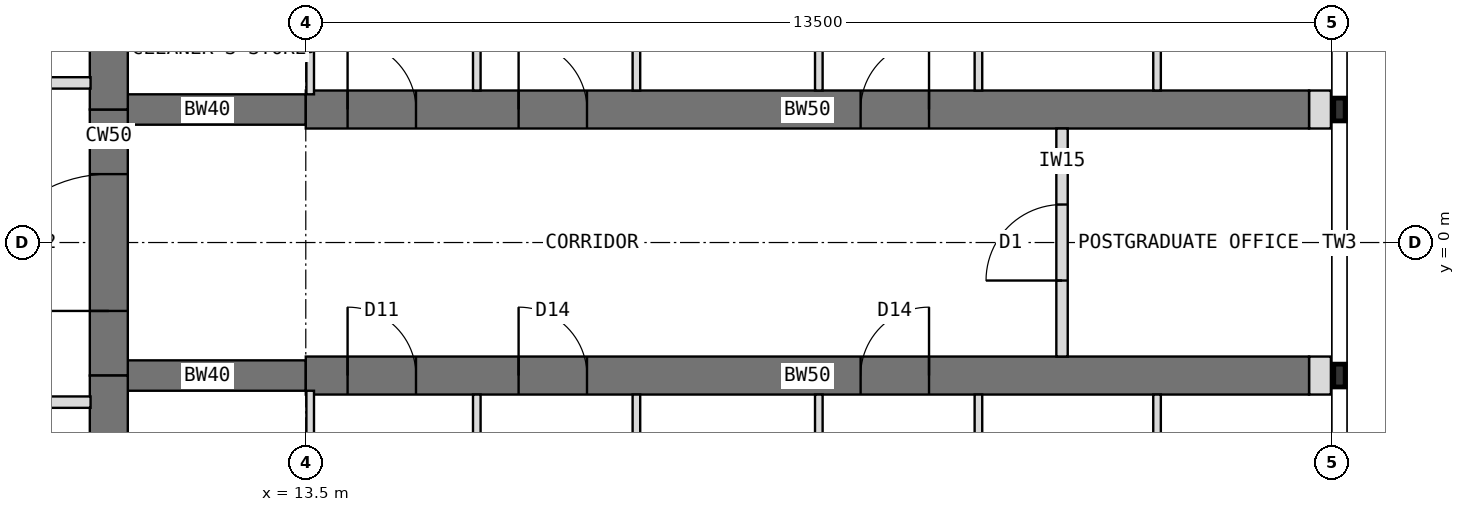
"""IFC4 building model, lengths in metres.
Left out: names, types, materials, properties, quantities, classifications, styles, units other than length and angle.
Written with IfcOpenShell. Run it as: python <this file> out.ifc"""

import sys

from ifc_helpers import new_model, si_unit, direction, frame, frame_2d, origin, place, context, subcontext, project, spatial, rectangle, extrude, element, fill, save


model = new_model("IFC4")
c1 = context("Model", 3, precision=1e-05, world=origin(), true_north=direction((0.0, 1.0)))
c2 = subcontext(c1, "Body", "Model", "MODEL_VIEW")
j1 = project(units=[si_unit("LENGTHUNIT", "METRE"), si_unit("PLANEANGLEUNIT", "RADIAN")], contexts=[c1])
p1 = place(None, origin())
s1 = spatial("IfcSite", under=j1, at=p1, CompositionType="ELEMENT")
p2 = place(p1, origin())
s2 = spatial("IfcBuilding", under=s1, at=p2, CompositionType="ELEMENT")
p3 = place(p2, frame((0.0, 0.0, 234.5)))
s3 = spatial("IfcBuildingStorey", under=s2, at=p3, CompositionType="ELEMENT", Elevation=234.5)
p4 = place(p3, frame((10.908, -6.298, 0.0), z_axis=(0.0, 0.0, 1.0), x_axis=(0.0, 1.0, 0.0)))
e1 = element("IfcWall", 1, at=p4, inside=s3, PredefinedType="SHEAR", context=c2, shape_type="SweptSolid", body=[
    extrude(rectangle(XDim=4.548, YDim=0.5, at=frame_2d((2.274, 0.0))), origin(), (0.0, 0.0, 1.0), 4.0),
])
p5 = place(p3, frame((10.908, -1.75, 0.0), z_axis=(0.0, 0.0, 1.0), x_axis=(0.0, 1.0, 0.0)))
e2 = element("IfcWall", 2, at=p5, inside=s3, PredefinedType="SHEAR", context=c2, shape_type="SweptSolid", body=[
    extrude(rectangle(XDim=3.5, YDim=0.5, at=frame_2d((1.75, 0.0))), origin(), (0.0, 0.0, 1.0), 4.0),
])
p6 = place(p5, frame((0.85, 0.0, 0.0)))
e3 = element("IfcOpeningElement", 3, at=p6, cuts=e2, PredefinedType="OPENING", context=c2, shape_type="SweptSolid", body=[
    extrude(rectangle(XDim=1.8, YDim=2.1, at=frame_2d((0.9, 1.05))), frame((0.0, 0.26, 0.0), z_axis=(0.0, -1.0, 0.0), x_axis=(1.0, 0.0, 0.0)), (0.0, 0.0, 1.0), 0.52),
])
p7 = place(p3, frame((10.908, 1.75, 0.0), z_axis=(0.0, 0.0, 1.0), x_axis=(0.0, 1.0, 0.0)))
e4 = element("IfcWall", 4, at=p7, inside=s3, PredefinedType="SHEAR", context=c2, shape_type="SweptSolid", body=[
    extrude(rectangle(XDim=4.548, YDim=0.5, at=frame_2d((2.274, 0.0))), origin(), (0.0, 0.0, 1.0), 4.0),
])
p8 = place(p3, frame((10.908, 1.75, 0.0), z_axis=(0.0, 0.0, 1.0), x_axis=(1.0, 0.0, 0.0)))
e5 = element("IfcWall", 5, at=p8, inside=s3, PredefinedType="SHEAR", context=c2, shape_type="SweptSolid", body=[
    extrude(rectangle(XDim=2.592, YDim=0.4, at=frame_2d((1.296, 0.0))), origin(), (0.0, 0.0, 1.0), 4.0),
])
p9 = place(p3, frame((13.5, 1.75, 0.0), z_axis=(0.0, 0.0, 1.0), x_axis=(1.0, 0.0, 0.0)))
e6 = element("IfcWall", 6, at=p9, inside=s3, PredefinedType="SHEAR", context=c2, shape_type="SweptSolid", body=[
    extrude(rectangle(XDim=13.2, YDim=0.5, at=frame_2d((6.6, 0.0))), origin(), (0.0, 0.0, 1.0), 4.0),
])
p10 = place(p9, frame((0.55, 0.0, 0.0)))
e7 = element("IfcOpeningElement", 7, at=p10, cuts=e6, PredefinedType="OPENING", context=c2, shape_type="SweptSolid", body=[
    extrude(rectangle(XDim=0.9, YDim=2.1, at=frame_2d((0.45, 1.05))), frame((0.0, 0.26, 0.0), z_axis=(0.0, -1.0, 0.0), x_axis=(1.0, 0.0, 0.0)), (0.0, 0.0, 1.0), 0.52),
])
p11 = place(p9, frame((2.8, 0.0, 0.0)))
e8 = element("IfcOpeningElement", 8, at=p11, cuts=e6, PredefinedType="OPENING", context=c2, shape_type="SweptSolid", body=[
    extrude(rectangle(XDim=0.9, YDim=2.1, at=frame_2d((0.45, 1.05))), frame((0.0, 0.26, 0.0), z_axis=(0.0, -1.0, 0.0), x_axis=(1.0, 0.0, 0.0)), (0.0, 0.0, 1.0), 0.52),
])
p12 = place(p9, frame((7.3, 0.0, 0.0)))
e9 = element("IfcOpeningElement", 9, at=p12, cuts=e6, PredefinedType="OPENING", context=c2, shape_type="SweptSolid", body=[
    extrude(rectangle(XDim=0.9, YDim=2.1, at=frame_2d((0.45, 1.05))), frame((0.0, 0.26, 0.0), z_axis=(0.0, -1.0, 0.0), x_axis=(1.0, 0.0, 0.0)), (0.0, 0.0, 1.0), 0.52),
])
p13 = place(p3, frame((10.908, -1.75, 0.0), z_axis=(0.0, 0.0, 1.0), x_axis=(1.0, 0.0, 0.0)))
e10 = element("IfcWall", 10, at=p13, inside=s3, PredefinedType="SHEAR", context=c2, shape_type="SweptSolid", body=[
    extrude(rectangle(XDim=2.592, YDim=0.4, at=frame_2d((1.296, 0.0))), origin(), (0.0, 0.0, 1.0), 4.0),
])
p14 = place(p3, frame((13.5, -1.75, 0.0), z_axis=(0.0, 0.0, 1.0), x_axis=(1.0, 0.0, 0.0)))
e11 = element("IfcWall", 11, at=p14, inside=s3, PredefinedType="SHEAR", context=c2, shape_type="SweptSolid", body=[
    extrude(rectangle(XDim=13.2, YDim=0.5, at=frame_2d((6.6, 0.0))), origin(), (0.0, 0.0, 1.0), 4.0),
])
p15 = place(p14, frame((0.55, 0.0, 0.0)))
e12 = element("IfcOpeningElement", 12, at=p15, cuts=e11, PredefinedType="OPENING", context=c2, shape_type="SweptSolid", body=[
    extrude(rectangle(XDim=0.9, YDim=2.1, at=frame_2d((0.45, 1.05))), frame((0.0, 0.26, 0.0), z_axis=(0.0, -1.0, 0.0), x_axis=(1.0, 0.0, 0.0)), (0.0, 0.0, 1.0), 0.52),
])
p16 = place(p14, frame((2.8, 0.0, 0.0)))
e13 = element("IfcOpeningElement", 13, at=p16, cuts=e11, PredefinedType="OPENING", context=c2, shape_type="SweptSolid", body=[
    extrude(rectangle(XDim=0.9, YDim=2.1, at=frame_2d((0.45, 1.05))), frame((0.0, 0.26, 0.0), z_axis=(0.0, -1.0, 0.0), x_axis=(1.0, 0.0, 0.0)), (0.0, 0.0, 1.0), 0.52),
])
p17 = place(p14, frame((7.3, 0.0, 0.0)))
e14 = element("IfcOpeningElement", 14, at=p17, cuts=e11, PredefinedType="OPENING", context=c2, shape_type="SweptSolid", body=[
    extrude(rectangle(XDim=0.9, YDim=2.1, at=frame_2d((0.45, 1.05))), frame((0.0, 0.26, 0.0), z_axis=(0.0, -1.0, 0.0), x_axis=(1.0, 0.0, 0.0)), (0.0, 0.0, 1.0), 0.52),
])
for number, where, z_axis, x_axis in (
    (15, (26.7, 1.75, 0.0), (0.0, 0.0, 1.0), (1.0, 0.0, 0.0)),
    (16, (26.7, -1.75, 0.0), (0.0, 0.0, 1.0), (1.0, 0.0, 0.0)),
):
    element("IfcWall", number, at=place(p3, frame(where, z_axis=z_axis, x_axis=x_axis)), inside=s3, PredefinedType="PARTITIONING", context=c2, shape_type="SweptSolid", body=[
        extrude(rectangle(XDim=0.288, YDim=0.5, at=frame_2d((0.144, 0.0))), origin(), (0.0, 0.0, 1.0), 3.7),
    ])
for number, where, z_axis, x_axis in (
    (17, (15.75, 2.0, 0.0), (0.0, 0.0, 1.0), (0.0, 1.0, 0.0)),
    (18, (20.25, 2.0, 0.0), (0.0, 0.0, 1.0), (0.0, 1.0, 0.0)),
):
    element("IfcWall", number, at=place(p3, frame(where, z_axis=z_axis, x_axis=x_axis)), inside=s3, PredefinedType="PARTITIONING", context=c2, shape_type="SweptSolid", body=[
        extrude(rectangle(XDim=4.75, YDim=0.1, at=frame_2d((2.375, 0.0))), origin(), (0.0, 0.0, 1.0), 3.7),
    ])
p18 = place(p3, frame((17.85, 2.0, 0.0), z_axis=(0.0, 0.0, 1.0), x_axis=(0.0, 1.0, 0.0)))
e19 = element("IfcWall", 19, at=p18, inside=s3, PredefinedType="PARTITIONING", context=c2, shape_type="SweptSolid", body=[
    extrude(rectangle(XDim=3.4, YDim=0.1, at=frame_2d((1.7, 0.0))), origin(), (0.0, 0.0, 1.0), 3.7),
])
p19 = place(p18, frame((1.25, 0.0, 0.0)))
e20 = element("IfcOpeningElement", 20, at=p19, cuts=e19, PredefinedType="OPENING", context=c2, shape_type="SweptSolid", body=[
    extrude(rectangle(XDim=0.9, YDim=2.1, at=frame_2d((0.45, 1.05))), frame((0.0, 0.06, 0.0), z_axis=(0.0, -1.0, 0.0), x_axis=(1.0, 0.0, 0.0)), (0.0, 0.0, 1.0), 0.12),
])
p20 = place(p3, frame((22.35, 2.0, 0.0), z_axis=(0.0, 0.0, 1.0), x_axis=(0.0, 1.0, 0.0)))
e21 = element("IfcWall", 21, at=p20, inside=s3, PredefinedType="PARTITIONING", context=c2, shape_type="SweptSolid", body=[
    extrude(rectangle(XDim=3.4, YDim=0.1, at=frame_2d((1.7, 0.0))), origin(), (0.0, 0.0, 1.0), 3.7),
])
p21 = place(p20, frame((1.25, 0.0, 0.0)))
e22 = element("IfcOpeningElement", 22, at=p21, cuts=e21, PredefinedType="OPENING", context=c2, shape_type="SweptSolid", body=[
    extrude(rectangle(XDim=0.9, YDim=2.1, at=frame_2d((0.45, 1.05))), frame((0.0, 0.06, 0.0), z_axis=(0.0, -1.0, 0.0), x_axis=(1.0, 0.0, 0.0)), (0.0, 0.0, 1.0), 0.12),
])
p22 = place(p3, frame((24.7, 2.0, 0.0), z_axis=(0.0, 0.0, 1.0), x_axis=(0.0, 1.0, 0.0)))
e23 = element("IfcWall", 23, at=p22, inside=s3, PredefinedType="PARTITIONING", context=c2, shape_type="SweptSolid", body=[
    extrude(rectangle(XDim=3.4, YDim=0.1, at=frame_2d((1.7, 0.0))), origin(), (0.0, 0.0, 1.0), 3.7),
])
p23 = place(p3, frame((13.558, 1.95, 0.0), z_axis=(0.0, 0.0, 1.0), x_axis=(0.0, 1.0, 0.0)))
e24 = element("IfcWall", 24, at=p23, inside=s3, PredefinedType="PARTITIONING", context=c2, shape_type="SweptSolid", body=[
    extrude(rectangle(XDim=1.2, YDim=0.1, at=frame_2d((0.6, 0.0))), origin(), (0.0, 0.0, 1.0), 3.167),
])
for number, where, z_axis, x_axis in (
    (25, (15.75, -2.0, 0.0), (0.0, 0.0, 1.0), (0.0, -1.0, 0.0)),
    (26, (20.25, -2.0, 0.0), (0.0, 0.0, 1.0), (0.0, -1.0, 0.0)),
):
    element("IfcWall", number, at=place(p3, frame(where, z_axis=z_axis, x_axis=x_axis)), inside=s3, PredefinedType="PARTITIONING", context=c2, shape_type="SweptSolid", body=[
        extrude(rectangle(XDim=4.75, YDim=0.1, at=frame_2d((2.375, 0.0))), origin(), (0.0, 0.0, 1.0), 3.7),
    ])
p24 = place(p3, frame((17.85, -2.0, 0.0), z_axis=(0.0, 0.0, 1.0), x_axis=(0.0, -1.0, 0.0)))
e27 = element("IfcWall", 27, at=p24, inside=s3, PredefinedType="PARTITIONING", context=c2, shape_type="SweptSolid", body=[
    extrude(rectangle(XDim=3.4, YDim=0.1, at=frame_2d((1.7, 0.0))), origin(), (0.0, 0.0, 1.0), 3.7),
])
p25 = place(p24, frame((1.25, 0.0, 0.0)))
e28 = element("IfcOpeningElement", 28, at=p25, cuts=e27, PredefinedType="OPENING", context=c2, shape_type="SweptSolid", body=[
    extrude(rectangle(XDim=0.9, YDim=2.1, at=frame_2d((0.45, 1.05))), frame((0.0, 0.06, 0.0), z_axis=(0.0, -1.0, 0.0), x_axis=(1.0, 0.0, 0.0)), (0.0, 0.0, 1.0), 0.12),
])
p26 = place(p3, frame((22.35, -2.0, 0.0), z_axis=(0.0, 0.0, 1.0), x_axis=(0.0, -1.0, 0.0)))
e29 = element("IfcWall", 29, at=p26, inside=s3, PredefinedType="PARTITIONING", context=c2, shape_type="SweptSolid", body=[
    extrude(rectangle(XDim=3.4, YDim=0.1, at=frame_2d((1.7, 0.0))), origin(), (0.0, 0.0, 1.0), 3.7),
])
p27 = place(p26, frame((1.25, 0.0, 0.0)))
e30 = element("IfcOpeningElement", 30, at=p27, cuts=e29, PredefinedType="OPENING", context=c2, shape_type="SweptSolid", body=[
    extrude(rectangle(XDim=0.9, YDim=2.1, at=frame_2d((0.45, 1.05))), frame((0.0, 0.06, 0.0), z_axis=(0.0, -1.0, 0.0), x_axis=(1.0, 0.0, 0.0)), (0.0, 0.0, 1.0), 0.12),
])
p28 = place(p3, frame((24.7, -2.0, 0.0), z_axis=(0.0, 0.0, 1.0), x_axis=(0.0, -1.0, 0.0)))
e31 = element("IfcWall", 31, at=p28, inside=s3, PredefinedType="PARTITIONING", context=c2, shape_type="SweptSolid", body=[
    extrude(rectangle(XDim=3.4, YDim=0.1, at=frame_2d((1.7, 0.0))), origin(), (0.0, 0.0, 1.0), 3.7),
])
p29 = place(p3, frame((13.558, -1.95, 0.0), z_axis=(0.0, 0.0, 1.0), x_axis=(0.0, -1.0, 0.0)))
e32 = element("IfcWall", 32, at=p29, inside=s3, PredefinedType="PARTITIONING", context=c2, shape_type="SweptSolid", body=[
    extrude(rectangle(XDim=3.2, YDim=0.1, at=frame_2d((1.6, 0.0))), origin(), (0.0, 0.0, 1.0), 3.167),
])
p30 = place(p3, frame((6.143, 2.1, 0.0), z_axis=(0.0, 0.0, 1.0), x_axis=(1.0, 0.0, 0.0)))
e33 = element("IfcWall", 33, at=p30, inside=s3, PredefinedType="PARTITIONING", context=c2, shape_type="SweptSolid", body=[
    extrude(rectangle(XDim=4.526, YDim=0.15, at=frame_2d((2.263, 0.0))), origin(), (0.0, 0.0, 1.0), 3.7),
])
p31 = place(p30, frame((0.858, 0.0, 0.0)))
e34 = element("IfcOpeningElement", 34, at=p31, cuts=e33, PredefinedType="OPENING", context=c2, shape_type="SweptSolid", body=[
    extrude(rectangle(XDim=1.0, YDim=2.1, at=frame_2d((0.5, 1.05))), frame((0.0, 0.085, 0.0), z_axis=(0.0, -1.0, 0.0), x_axis=(1.0, 0.0, 0.0)), (0.0, 0.0, 1.0), 0.17),
])
p32 = place(p3, frame((10.668, -2.1, 0.0), z_axis=(0.0, 0.0, 1.0), x_axis=(-1.0, 0.0, 0.0)))
e35 = element("IfcWall", 35, at=p32, inside=s3, PredefinedType="PARTITIONING", context=c2, shape_type="SweptSolid", body=[
    extrude(rectangle(XDim=4.526, YDim=0.15, at=frame_2d((2.263, 0.0))), origin(), (0.0, 0.0, 1.0), 3.7),
])
p33 = place(p32, frame((2.668, 0.0, 0.0)))
e36 = element("IfcOpeningElement", 36, at=p33, cuts=e35, PredefinedType="OPENING", context=c2, shape_type="SweptSolid", body=[
    extrude(rectangle(XDim=1.0, YDim=2.1, at=frame_2d((0.5, 1.05))), frame((0.0, 0.085, 0.0), z_axis=(0.0, -1.0, 0.0), x_axis=(1.0, 0.0, 0.0)), (0.0, 0.0, 1.0), 0.17),
])
p34 = place(p3, frame((23.45, -1.5, 0.0), z_axis=(0.0, 0.0, 1.0), x_axis=(0.0, 1.0, 0.0)))
e37 = element("IfcWall", 37, at=p34, inside=s3, PredefinedType="PARTITIONING", context=c2, shape_type="SweptSolid", body=[
    extrude(rectangle(XDim=3.0, YDim=0.15, at=frame_2d((1.5, 0.0))), origin(), (0.0, 0.0, 1.0), 3.7),
])
p35 = place(p34, frame((1.0, 0.0, 0.0)))
e38 = element("IfcOpeningElement", 38, at=p35, cuts=e37, PredefinedType="OPENING", context=c2, shape_type="SweptSolid", body=[
    extrude(rectangle(XDim=1.0, YDim=2.1, at=frame_2d((0.5, 1.05))), frame((0.0, 0.085, 0.0), z_axis=(0.0, -1.0, 0.0), x_axis=(1.0, 0.0, 0.0)), (0.0, 0.0, 1.0), 0.17),
])
p36 = place(p6, origin())
e39 = element("IfcDoor", 39, at=p36, inside=s3, OperationType="DOUBLE_DOOR_DOUBLE_SWING", PredefinedType="DOOR", context=c2, shape_type="SweptSolid", body=[
    extrude(rectangle(XDim=1.8, YDim=2.1, at=frame_2d((0.9, 1.05))), frame((0.0, 0.025, 0.0), z_axis=(0.0, -1.0, 0.0), x_axis=(1.0, 0.0, 0.0)), (0.0, 0.0, 1.0), 0.05),
])
fill(e3, e39)
p37 = place(p35, origin())
e40 = element("IfcDoor", 40, at=p37, inside=s3, OperationType="SINGLE_SWING_LEFT", PredefinedType="DOOR", context=c2, shape_type="SweptSolid", body=[
    extrude(rectangle(XDim=1.0, YDim=2.1, at=frame_2d((0.5, 1.05))), frame((0.0, 0.025, 0.0), z_axis=(0.0, -1.0, 0.0), x_axis=(1.0, 0.0, 0.0)), (0.0, 0.0, 1.0), 0.05),
])
fill(e38, e40)
p38 = place(p10, origin())
e41 = element("IfcDoor", 41, at=p38, inside=s3, OperationType="SINGLE_SWING_LEFT", PredefinedType="DOOR", context=c2, shape_type="SweptSolid", body=[
    extrude(rectangle(XDim=0.9, YDim=2.1, at=frame_2d((0.45, 1.05))), frame((0.0, 0.025, 0.0), z_axis=(0.0, -1.0, 0.0), x_axis=(1.0, 0.0, 0.0)), (0.0, 0.0, 1.0), 0.05),
])
fill(e7, e41)
p39 = place(p11, origin())
e42 = element("IfcDoor", 42, at=p39, inside=s3, OperationType="SINGLE_SWING_LEFT", PredefinedType="DOOR", context=c2, shape_type="SweptSolid", body=[
    extrude(rectangle(XDim=0.9, YDim=2.1, at=frame_2d((0.45, 1.05))), frame((0.0, 0.025, 0.0), z_axis=(0.0, -1.0, 0.0), x_axis=(1.0, 0.0, 0.0)), (0.0, 0.0, 1.0), 0.05),
])
fill(e8, e42)
p40 = place(p12, origin())
e43 = element("IfcDoor", 43, at=p40, inside=s3, OperationType="SINGLE_SWING_RIGHT", PredefinedType="DOOR", context=c2, shape_type="SweptSolid", body=[
    extrude(rectangle(XDim=0.9, YDim=2.1, at=frame_2d((0.45, 1.05))), frame((0.0, 0.025, 0.0), z_axis=(0.0, -1.0, 0.0), x_axis=(1.0, 0.0, 0.0)), (0.0, 0.0, 1.0), 0.05),
])
fill(e9, e43)
p41 = place(p15, origin())
e44 = element("IfcDoor", 44, at=p41, inside=s3, OperationType="SINGLE_SWING_LEFT", PredefinedType="DOOR", context=c2, shape_type="SweptSolid", body=[
    extrude(rectangle(XDim=0.9, YDim=2.1, at=frame_2d((0.45, 1.05))), frame((0.0, 0.025, 0.0), z_axis=(0.0, -1.0, 0.0), x_axis=(1.0, 0.0, 0.0)), (0.0, 0.0, 1.0), 0.05),
])
fill(e12, e44)
p42 = place(p16, origin())
e45 = element("IfcDoor", 45, at=p42, inside=s3, OperationType="SINGLE_SWING_LEFT", PredefinedType="DOOR", context=c2, shape_type="SweptSolid", body=[
    extrude(rectangle(XDim=0.9, YDim=2.1, at=frame_2d((0.45, 1.05))), frame((0.0, 0.025, 0.0), z_axis=(0.0, -1.0, 0.0), x_axis=(1.0, 0.0, 0.0)), (0.0, 0.0, 1.0), 0.05),
])
fill(e13, e45)
p43 = place(p17, origin())
e46 = element("IfcDoor", 46, at=p43, inside=s3, OperationType="SINGLE_SWING_RIGHT", PredefinedType="DOOR", context=c2, shape_type="SweptSolid", body=[
    extrude(rectangle(XDim=0.9, YDim=2.1, at=frame_2d((0.45, 1.05))), frame((0.0, 0.025, 0.0), z_axis=(0.0, -1.0, 0.0), x_axis=(1.0, 0.0, 0.0)), (0.0, 0.0, 1.0), 0.05),
])
fill(e14, e46)
save(model, sys.argv[1])
